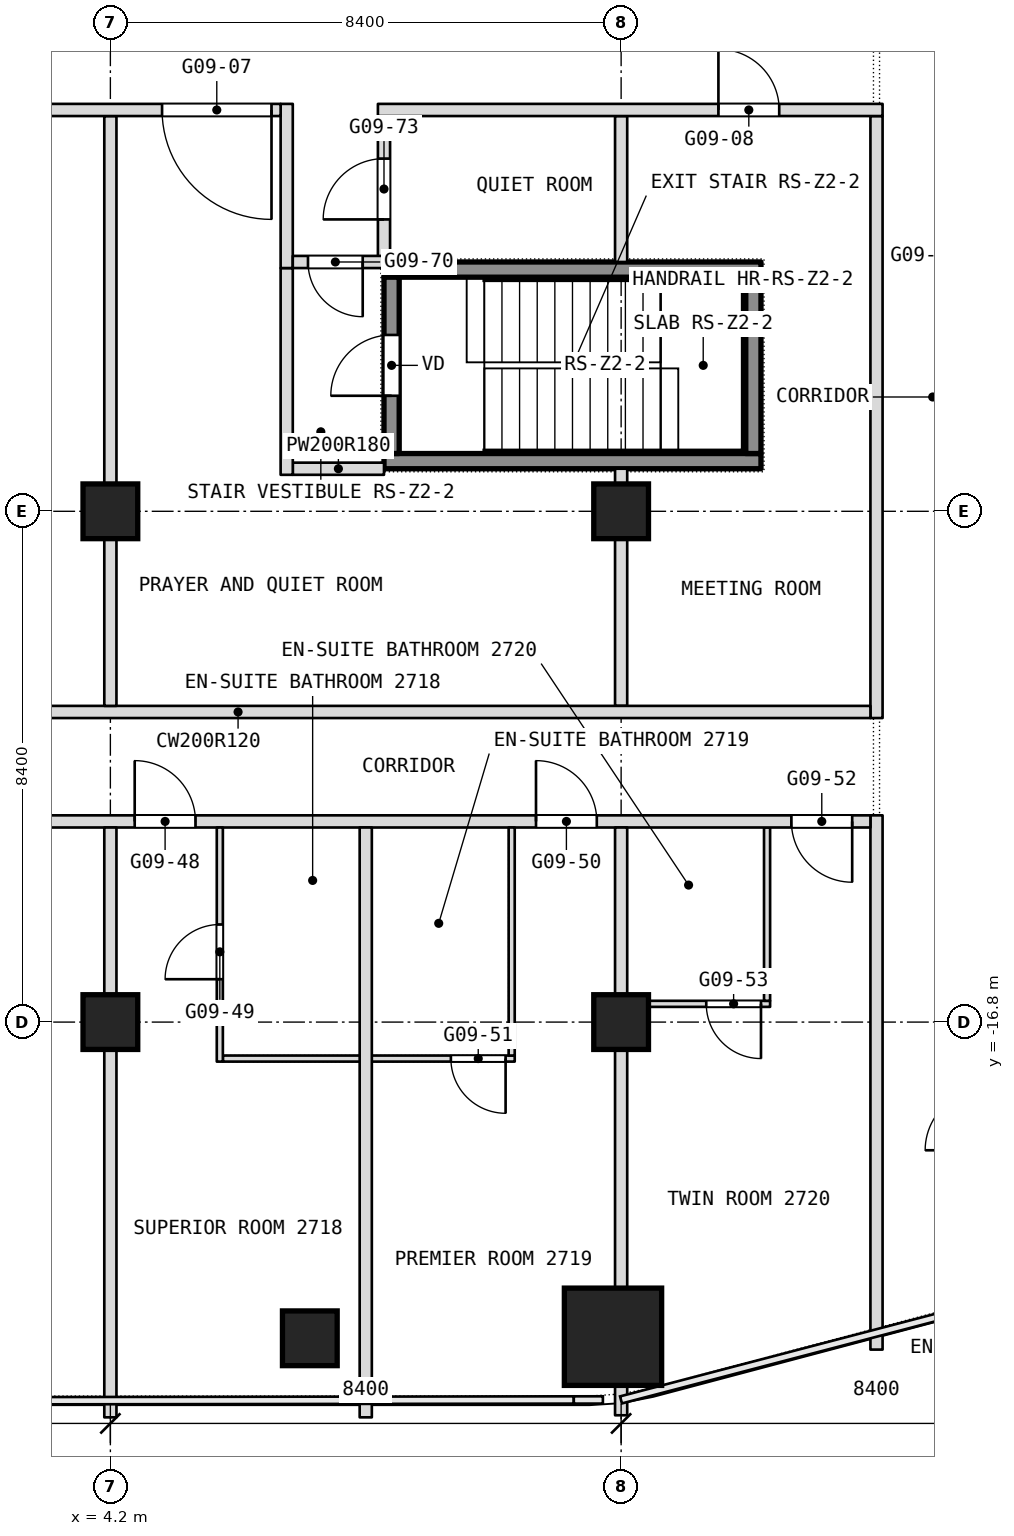
"""IFC4 building model, lengths in metres.
Left out: names, types, materials, properties, quantities, classifications, styles, units other than length and angle.
Written with IfcOpenShell. Run it as: python <this file> out.ifc"""

import sys

from ifc_helpers import new_model, si_unit, direction, frame, frame_2d, origin, origin_2d, place, context, subcontext, project, spatial, rectangle, extrude, element, fill, save


model = new_model("IFC4")
c1 = context("Model", 3, precision=1e-05, world=origin(), true_north=direction((0.0, 1.0)))
c2 = subcontext(c1, "Body", "Model", "MODEL_VIEW")
j1 = project(units=[si_unit("LENGTHUNIT", "METRE"), si_unit("PLANEANGLEUNIT", "RADIAN")], contexts=[c1])
p1 = place(None, origin())
s1 = spatial("IfcSite", under=j1, at=p1, CompositionType="ELEMENT")
p2 = place(p1, origin())
s2 = spatial("IfcBuilding", under=s1, at=p2, CompositionType="ELEMENT")
p3 = place(p2, frame((0.0, 0.0, 122.9)))
s3 = spatial("IfcBuildingStorey", under=s2, at=p3, CompositionType="ELEMENT", Elevation=122.9)
p4 = place(p3, frame((12.466, -21.975, 0.0), z_axis=(0.0, 0.0, 1.0), x_axis=(1.0, 0.0, 0.0)))
e1 = element("IfcColumn", 1, at=p4, inside=s3, PredefinedType="COLUMN", context=c2, shape_type="SweptSolid", body=[
    extrude(rectangle(XDim=1.6, YDim=1.6, at=origin_2d()), origin(), (0.0, 0.0, 1.0), 3.6),
])
for number, where, z_axis, x_axis in (
    (2, (4.2, -16.8, 0.0), (0.0, 0.0, 1.0), (1.0, 0.0, 0.0)),
    (3, (4.2, -8.4, 0.0), (0.0, 0.0, 1.0), (1.0, 0.0, 0.0)),
    (4, (12.6, -16.8, 0.0), (0.0, 0.0, 1.0), (1.0, 0.0, 0.0)),
    (5, (12.6, -8.4, 0.0), (0.0, 0.0, 1.0), (1.0, 0.0, 0.0)),
    (6, (7.48, -22.0, 0.0), (0.0, 0.0, 1.0), (1.0, 0.0, 0.0)),
):
    element("IfcColumn", number, at=place(p3, frame(where, z_axis=z_axis, x_axis=x_axis)), inside=s3, PredefinedType="COLUMN", context=c2, shape_type="SweptSolid", body=[
        extrude(rectangle(XDim=0.9, YDim=0.9, at=origin_2d()), origin(), (0.0, 0.0, 1.0), 3.6),
    ])
p5 = place(p3, frame((6.05, -17.4, 0.0), z_axis=(0.0, 0.0, 1.0), x_axis=(1.0, 0.0, 0.0)))
e7 = element("IfcWall", 7, at=p5, inside=s3, PredefinedType="PARTITIONING", context=c2, shape_type="SweptSolid", body=[
    extrude(rectangle(XDim=4.8, YDim=0.1, at=frame_2d((2.4, 0.0))), origin(), (0.0, 0.0, 1.0), 3.34),
])
p6 = place(p5, frame((3.75, 0.0, 0.0)))
e8 = element("IfcOpeningElement", 8, at=p6, cuts=e7, PredefinedType="OPENING", context=c2, shape_type="SweptSolid", body=[
    extrude(rectangle(XDim=0.9, YDim=2.1, at=frame_2d((0.45, 1.05))), frame((0.0, 0.05, 0.0), z_axis=(0.0, -1.0, 0.0), x_axis=(1.0, 0.0, 0.0)), (0.0, 0.0, 1.0), 0.1),
])
p7 = place(p3, frame((16.8, -22.186, 0.0), z_axis=(0.0, 0.0, 1.0), x_axis=(0.0, 1.0, 0.0)))
e9 = element("IfcWall", 9, at=p7, inside=s3, PredefinedType="PARTITIONING", context=c2, shape_type="SweptSolid", body=[
    extrude(rectangle(XDim=8.786, YDim=0.2, at=frame_2d((4.393, 0.0))), origin(), (0.0, 0.0, 1.0), 3.34),
])
p8 = place(p3, frame((16.8, -11.8, 0.0), z_axis=(0.0, 0.0, 1.0), x_axis=(0.0, 1.0, 0.0)))
e10 = element("IfcWall", 10, at=p8, inside=s3, PredefinedType="PARTITIONING", context=c2, shape_type="SweptSolid", body=[
    extrude(rectangle(XDim=9.9, YDim=0.2, at=frame_2d((4.95, 0.0))), origin(), (0.0, 0.0, 1.0), 3.34),
])
p9 = place(p3, frame((12.7, -16.5, 0.0), z_axis=(0.0, 0.0, 1.0), x_axis=(1.0, 0.0, 0.0)))
e11 = element("IfcWall", 11, at=p9, inside=s3, PredefinedType="PARTITIONING", context=c2, shape_type="SweptSolid", body=[
    extrude(rectangle(XDim=2.35, YDim=0.1, at=frame_2d((1.175, 0.0))), origin(), (0.0, 0.0, 1.0), 3.34),
])
p10 = place(p9, frame((1.3, 0.0, 0.0)))
e12 = element("IfcOpeningElement", 12, at=p10, cuts=e11, PredefinedType="OPENING", context=c2, shape_type="SweptSolid", body=[
    extrude(rectangle(XDim=0.9, YDim=2.1, at=frame_2d((0.45, 1.05))), frame((0.0, 0.05, 0.0), z_axis=(0.0, -1.0, 0.0), x_axis=(1.0, 0.0, 0.0)), (0.0, 0.0, 1.0), 0.1),
])
p11 = place(p3, frame((15.0, -16.45, 0.0), z_axis=(0.0, 0.0, 1.0), x_axis=(0.0, 1.0, 0.0)))
e13 = element("IfcWall", 13, at=p11, inside=s3, PredefinedType="PARTITIONING", context=c2, shape_type="SweptSolid", body=[
    extrude(rectangle(XDim=2.85, YDim=0.1, at=frame_2d((1.425, 0.0))), origin(), (0.0, 0.0, 1.0), 3.34),
])
p12 = place(p3, frame((-3.2, -13.5, 0.0), z_axis=(0.0, 0.0, 1.0), x_axis=(1.0, 0.0, 0.0)))
e14 = element("IfcWall", 14, at=p12, inside=s3, PredefinedType="PARTITIONING", context=c2, shape_type="SweptSolid", body=[
    extrude(rectangle(XDim=19.9, YDim=0.2, at=frame_2d((9.95, 0.0))), origin(), (0.0, 0.0, 1.0), 3.34),
])
p13 = place(p12, frame((2.3, 0.0, 0.0)))
e15 = element("IfcOpeningElement", 15, at=p13, cuts=e14, PredefinedType="OPENING", context=c2, shape_type="SweptSolid", body=[
    extrude(rectangle(XDim=1.8, YDim=2.1, at=frame_2d((0.9, 1.05))), frame((0.0, 0.1, 0.0), z_axis=(0.0, -1.0, 0.0), x_axis=(1.0, 0.0, 0.0)), (0.0, 0.0, 1.0), 0.2),
])
p14 = place(p12, frame((7.8, 0.0, 0.0)))
e16 = element("IfcOpeningElement", 16, at=p14, cuts=e14, PredefinedType="OPENING", context=c2, shape_type="SweptSolid", body=[
    extrude(rectangle(XDim=1.0, YDim=2.1, at=frame_2d((0.5, 1.05))), frame((0.0, 0.1, 0.0), z_axis=(0.0, -1.0, 0.0), x_axis=(1.0, 0.0, 0.0)), (0.0, 0.0, 1.0), 0.2),
])
p15 = place(p12, frame((14.4, 0.0, 0.0)))
e17 = element("IfcOpeningElement", 17, at=p15, cuts=e14, PredefinedType="OPENING", context=c2, shape_type="SweptSolid", body=[
    extrude(rectangle(XDim=1.0, YDim=2.1, at=frame_2d((0.5, 1.05))), frame((0.0, 0.1, 0.0), z_axis=(0.0, -1.0, 0.0), x_axis=(1.0, 0.0, 0.0)), (0.0, 0.0, 1.0), 0.2),
])
p16 = place(p12, frame((18.6, 0.0, 0.0)))
e18 = element("IfcOpeningElement", 18, at=p16, cuts=e14, PredefinedType="OPENING", context=c2, shape_type="SweptSolid", body=[
    extrude(rectangle(XDim=1.0, YDim=2.1, at=frame_2d((0.5, 1.05))), frame((0.0, 0.1, 0.0), z_axis=(0.0, -1.0, 0.0), x_axis=(1.0, 0.0, 0.0)), (0.0, 0.0, 1.0), 0.2),
])
p17 = place(p3, frame((12.6, -23.266, 0.0), z_axis=(0.0, 0.0, 1.0), x_axis=(0.0, 1.0, 0.0)))
e19 = element("IfcWall", 19, at=p17, inside=s3, PredefinedType="PARTITIONING", context=c2, shape_type="SweptSolid", body=[
    extrude(rectangle(XDim=0.491, YDim=0.2, at=frame_2d((0.246, 0.0))), origin(), (0.0, 0.0, 1.0), 3.34),
])
p18 = place(p3, frame((12.6, -21.175, 0.0), z_axis=(0.0, 0.0, 1.0), x_axis=(0.0, 1.0, 0.0)))
e20 = element("IfcWall", 20, at=p18, inside=s3, PredefinedType="PARTITIONING", context=c2, shape_type="SweptSolid", body=[
    extrude(rectangle(XDim=7.575, YDim=0.2, at=frame_2d((3.788, 0.0))), origin(), (0.0, 0.0, 1.0), 3.34),
])
p19 = place(p3, frame((12.6, -11.6, 0.0), z_axis=(0.0, 0.0, 1.0), x_axis=(0.0, 1.0, 0.0)))
e21 = element("IfcWall", 21, at=p19, inside=s3, PredefinedType="PARTITIONING", context=c2, shape_type="SweptSolid", body=[
    extrude(rectangle(XDim=3.9, YDim=0.2, at=frame_2d((1.95, 0.0))), origin(), (0.0, 0.0, 1.0), 3.34),
])
p20 = place(p3, frame((12.6, -4.3, 0.0), z_axis=(0.0, 0.0, 1.0), x_axis=(0.0, 1.0, 0.0)))
e22 = element("IfcWall", 22, at=p20, inside=s3, PredefinedType="PARTITIONING", context=c2, shape_type="SweptSolid", body=[
    extrude(rectangle(XDim=2.4, YDim=0.2, at=frame_2d((1.2, 0.0))), origin(), (0.0, 0.0, 1.0), 3.34),
])
p21 = place(p3, frame((-4.1, -11.7, 0.0), z_axis=(0.0, 0.0, 1.0), x_axis=(1.0, 0.0, 0.0)))
e23 = element("IfcWall", 23, at=p21, inside=s3, PredefinedType="PARTITIONING", context=c2, shape_type="SweptSolid", body=[
    extrude(rectangle(XDim=20.8, YDim=0.2, at=frame_2d((10.4, 0.0))), origin(), (0.0, 0.0, 1.0), 3.34),
])
p22 = place(p3, frame((10.8, -17.35, 0.0), z_axis=(0.0, 0.0, 1.0), x_axis=(0.0, 1.0, 0.0)))
e24 = element("IfcWall", 24, at=p22, inside=s3, PredefinedType="PARTITIONING", context=c2, shape_type="SweptSolid", body=[
    extrude(rectangle(XDim=3.75, YDim=0.1, at=frame_2d((1.875, 0.0))), origin(), (0.0, 0.0, 1.0), 3.34),
])
p23 = place(p3, frame((8.7, -4.3, 0.0), z_axis=(0.0, 0.0, 1.0), x_axis=(0.0, 1.0, 0.0)))
e25 = element("IfcWall", 25, at=p23, inside=s3, PredefinedType="PARTITIONING", context=c2, shape_type="SweptSolid", body=[
    extrude(rectangle(XDim=2.4, YDim=0.2, at=frame_2d((1.2, 0.0))), origin(), (0.0, 0.0, 1.0), 3.34),
])
p24 = place(p23, frame((0.7, 0.0, 0.0)))
e26 = element("IfcOpeningElement", 26, at=p24, cuts=e25, PredefinedType="OPENING", context=c2, shape_type="SweptSolid", body=[
    extrude(rectangle(XDim=1.0, YDim=2.1, at=frame_2d((0.5, 1.05))), frame((0.0, 0.1, 0.0), z_axis=(0.0, -1.0, 0.0), x_axis=(1.0, 0.0, 0.0)), (0.0, 0.0, 1.0), 0.2),
])
p25 = place(p3, frame((8.4, -23.3, 0.0), z_axis=(0.0, 0.0, 1.0), x_axis=(0.0, 1.0, 0.0)))
e27 = element("IfcWall", 27, at=p25, inside=s3, PredefinedType="PARTITIONING", context=c2, shape_type="SweptSolid", body=[
    extrude(rectangle(XDim=9.7, YDim=0.2, at=frame_2d((4.85, 0.0))), origin(), (0.0, 0.0, 1.0), 3.34),
])
p26 = place(p3, frame((7.2, -7.7, 0.0), z_axis=(0.0, 0.0, 1.0), x_axis=(1.0, 0.0, 0.0)))
e28 = element("IfcWall", 28, at=p26, inside=s3, PredefinedType="PARTITIONING", context=c2, shape_type="SweptSolid", body=[
    extrude(rectangle(XDim=1.5, YDim=0.2, at=frame_2d((0.75, 0.0))), origin(), (0.0, 0.0, 1.0), 3.34),
])
p27 = place(p3, frame((7.1, -7.8, 0.0), z_axis=(0.0, 0.0, 1.0), x_axis=(0.0, 1.0, 0.0)))
e29 = element("IfcWall", 29, at=p27, inside=s3, PredefinedType="PARTITIONING", context=c2, shape_type="SweptSolid", body=[
    extrude(rectangle(XDim=3.4, YDim=0.2, at=frame_2d((1.7, 0.0))), origin(), (0.0, 0.0, 1.0), 3.34),
])
p28 = place(p3, frame((7.1, -4.4, 0.0), z_axis=(0.0, 0.0, 1.0), x_axis=(0.0, 1.0, 0.0)))
e30 = element("IfcWall", 30, at=p28, inside=s3, PredefinedType="PARTITIONING", context=c2, shape_type="SweptSolid", body=[
    extrude(rectangle(XDim=2.7, YDim=0.2, at=frame_2d((1.35, 0.0))), origin(), (0.0, 0.0, 1.0), 3.34),
])
p29 = place(p3, frame((6.0, -17.45, 0.0), z_axis=(0.0, 0.0, 1.0), x_axis=(0.0, 1.0, 0.0)))
e31 = element("IfcWall", 31, at=p29, inside=s3, PredefinedType="PARTITIONING", context=c2, shape_type="SweptSolid", body=[
    extrude(rectangle(XDim=3.85, YDim=0.1, at=frame_2d((1.925, 0.0))), origin(), (0.0, 0.0, 1.0), 3.34),
])
p30 = place(p29, frame((1.355, 0.0, 0.0)))
e32 = element("IfcOpeningElement", 32, at=p30, cuts=e31, PredefinedType="OPENING", context=c2, shape_type="SweptSolid", body=[
    extrude(rectangle(XDim=0.9, YDim=2.1, at=frame_2d((0.45, 1.05))), frame((0.0, 0.05, 0.0), z_axis=(0.0, -1.0, 0.0), x_axis=(1.0, 0.0, 0.0)), (0.0, 0.0, 1.0), 0.1),
])
p31 = place(p3, frame((7.2, -4.3, 0.0), z_axis=(0.0, 0.0, 1.0), x_axis=(1.0, 0.0, 0.0)))
e33 = element("IfcWall", 33, at=p31, inside=s3, PredefinedType="PARTITIONING", context=c2, shape_type="SweptSolid", body=[
    extrude(rectangle(XDim=1.5, YDim=0.2, at=frame_2d((0.75, 0.0))), origin(), (0.0, 0.0, 1.0), 3.34),
])
p32 = place(p31, frame((0.25, 0.0, 0.0)))
e34 = element("IfcOpeningElement", 34, at=p32, cuts=e33, PredefinedType="OPENING", context=c2, shape_type="SweptSolid", body=[
    extrude(rectangle(XDim=0.9, YDim=2.1, at=frame_2d((0.45, 1.05))), frame((0.0, 0.1, 0.0), z_axis=(0.0, -1.0, 0.0), x_axis=(1.0, 0.0, 0.0)), (0.0, 0.0, 1.0), 0.2),
])
p33 = place(p3, frame((4.2, -23.3, 0.0), z_axis=(0.0, 0.0, 1.0), x_axis=(0.0, 1.0, 0.0)))
e35 = element("IfcWall", 35, at=p33, inside=s3, PredefinedType="PARTITIONING", context=c2, shape_type="SweptSolid", body=[
    extrude(rectangle(XDim=9.7, YDim=0.2, at=frame_2d((4.85, 0.0))), origin(), (0.0, 0.0, 1.0), 3.34),
])
p34 = place(p3, frame((4.2, -11.6, 0.0), z_axis=(0.0, 0.0, 1.0), x_axis=(0.0, 1.0, 0.0)))
e36 = element("IfcWall", 36, at=p34, inside=s3, PredefinedType="PARTITIONING", context=c2, shape_type="SweptSolid", body=[
    extrude(rectangle(XDim=9.7, YDim=0.2, at=frame_2d((4.85, 0.0))), origin(), (0.0, 0.0, 1.0), 3.34),
])
p35 = place(p3, frame((-4.3, -1.8, 0.0), z_axis=(0.0, 0.0, 1.0), x_axis=(1.0, 0.0, 0.0)))
e37 = element("IfcWall", 37, at=p35, inside=s3, PredefinedType="PARTITIONING", context=c2, shape_type="SweptSolid", body=[
    extrude(rectangle(XDim=11.3, YDim=0.2, at=frame_2d((5.65, 0.0))), origin(), (0.0, 0.0, 1.0), 3.34),
])
p36 = place(p35, frame((1.7, 0.0, 0.0)))
e38 = element("IfcOpeningElement", 38, at=p36, cuts=e37, PredefinedType="OPENING", context=c2, shape_type="SweptSolid", body=[
    extrude(rectangle(XDim=1.0, YDim=2.1, at=frame_2d((0.5, 1.05))), frame((0.0, 0.1, 0.0), z_axis=(0.0, -1.0, 0.0), x_axis=(1.0, 0.0, 0.0)), (0.0, 0.0, 1.0), 0.2),
])
p37 = place(p35, frame((5.9, 0.0, 0.0)))
e39 = element("IfcOpeningElement", 39, at=p37, cuts=e37, PredefinedType="OPENING", context=c2, shape_type="SweptSolid", body=[
    extrude(rectangle(XDim=1.0, YDim=2.1, at=frame_2d((0.5, 1.05))), frame((0.0, 0.1, 0.0), z_axis=(0.0, -1.0, 0.0), x_axis=(1.0, 0.0, 0.0)), (0.0, 0.0, 1.0), 0.2),
])
p38 = place(p35, frame((9.35, 0.0, 0.0)))
e40 = element("IfcOpeningElement", 40, at=p38, cuts=e37, PredefinedType="OPENING", context=c2, shape_type="SweptSolid", body=[
    extrude(rectangle(XDim=1.8, YDim=2.1, at=frame_2d((0.9, 1.05))), frame((0.0, 0.1, 0.0), z_axis=(0.0, -1.0, 0.0), x_axis=(1.0, 0.0, 0.0)), (0.0, 0.0, 1.0), 0.2),
])
p39 = place(p3, frame((8.6, -1.8, 0.0), z_axis=(0.0, 0.0, 1.0), x_axis=(1.0, 0.0, 0.0)))
e41 = element("IfcWall", 41, at=p39, inside=s3, PredefinedType="PARTITIONING", context=c2, shape_type="SweptSolid", body=[
    extrude(rectangle(XDim=8.3, YDim=0.2, at=frame_2d((4.15, 0.0))), origin(), (0.0, 0.0, 1.0), 3.34),
])
p40 = place(p39, frame((5.6, 0.0, 0.0)))
e42 = element("IfcOpeningElement", 42, at=p40, cuts=e41, PredefinedType="OPENING", context=c2, shape_type="SweptSolid", body=[
    extrude(rectangle(XDim=1.0, YDim=2.1, at=frame_2d((0.5, 1.05))), frame((0.0, 0.1, 0.0), z_axis=(0.0, -1.0, 0.0), x_axis=(1.0, 0.0, 0.0)), (0.0, 0.0, 1.0), 0.2),
])
for number, where, z_axis, x_axis in (
    (43, (8.7, -7.575, 0.1), (0.0, 0.0, 1.0), (1.0, 0.0, 0.0)),
    (44, (8.7, -4.425, 0.1), (0.0, 0.0, 1.0), (1.0, 0.0, 0.0)),
):
    element("IfcWall", number, at=place(p3, frame(where, z_axis=z_axis, x_axis=x_axis)), inside=s3, PredefinedType="SHEAR", context=c2, shape_type="SweptSolid", body=[
        extrude(rectangle(XDim=6.2, YDim=0.25, at=frame_2d((3.1, 0.0))), origin(), (0.0, 0.0, 1.0), 3.6),
    ])
p41 = place(p3, frame((8.825, -7.45, 0.1), z_axis=(0.0, 0.0, 1.0), x_axis=(0.0, 1.0, 0.0)))
e45 = element("IfcWall", 45, at=p41, inside=s3, PredefinedType="SHEAR", context=c2, shape_type="SweptSolid", body=[
    extrude(rectangle(XDim=2.9, YDim=0.25, at=frame_2d((1.45, 0.0))), origin(), (0.0, 0.0, 1.0), 3.6),
])
p42 = place(p41, frame((0.95, 0.0, 0.0)))
e46 = element("IfcOpeningElement", 46, at=p42, cuts=e45, PredefinedType="OPENING", context=c2, shape_type="SweptSolid", body=[
    extrude(rectangle(XDim=1.0, YDim=2.1, at=frame_2d((0.5, 1.05))), frame((0.0, 0.125, 0.0), z_axis=(0.0, -1.0, 0.0), x_axis=(1.0, 0.0, 0.0)), (0.0, 0.0, 1.0), 0.25),
])
p43 = place(p3, frame((14.775, -7.45, 0.1), z_axis=(0.0, 0.0, 1.0), x_axis=(0.0, 1.0, 0.0)))
e47 = element("IfcWall", 47, at=p43, inside=s3, PredefinedType="SHEAR", context=c2, shape_type="SweptSolid", body=[
    extrude(rectangle(XDim=2.9, YDim=0.25, at=frame_2d((1.45, 0.0))), origin(), (0.0, 0.0, 1.0), 3.6),
])
p44 = place(p6, origin())
e48 = element("IfcDoor", 48, at=p44, inside=s3, OperationType="SINGLE_SWING_RIGHT", PredefinedType="DOOR", context=c2, shape_type="SweptSolid", body=[
    extrude(rectangle(XDim=0.9, YDim=2.1, at=frame_2d((0.45, 1.05))), frame((0.0, 0.025, 0.0), z_axis=(0.0, -1.0, 0.0), x_axis=(1.0, 0.0, 0.0)), (0.0, 0.0, 1.0), 0.05),
])
fill(e8, e48)
p45 = place(p10, origin())
e49 = element("IfcDoor", 49, at=p45, inside=s3, OperationType="SINGLE_SWING_RIGHT", PredefinedType="DOOR", context=c2, shape_type="SweptSolid", body=[
    extrude(rectangle(XDim=0.9, YDim=2.1, at=frame_2d((0.45, 1.05))), frame((0.0, 0.025, 0.0), z_axis=(0.0, -1.0, 0.0), x_axis=(1.0, 0.0, 0.0)), (0.0, 0.0, 1.0), 0.05),
])
fill(e12, e49)
p46 = place(p14, origin())
e50 = element("IfcDoor", 50, at=p46, inside=s3, OperationType="SINGLE_SWING_RIGHT", PredefinedType="DOOR", context=c2, shape_type="SweptSolid", body=[
    extrude(rectangle(XDim=1.0, YDim=2.1, at=frame_2d((0.5, 1.05))), frame((0.0, 0.025, 0.0), z_axis=(0.0, -1.0, 0.0), x_axis=(1.0, 0.0, 0.0)), (0.0, 0.0, 1.0), 0.05),
])
fill(e16, e50)
p47 = place(p15, origin())
e51 = element("IfcDoor", 51, at=p47, inside=s3, OperationType="SINGLE_SWING_RIGHT", PredefinedType="DOOR", context=c2, shape_type="SweptSolid", body=[
    extrude(rectangle(XDim=1.0, YDim=2.1, at=frame_2d((0.5, 1.05))), frame((0.0, 0.025, 0.0), z_axis=(0.0, -1.0, 0.0), x_axis=(1.0, 0.0, 0.0)), (0.0, 0.0, 1.0), 0.05),
])
fill(e17, e51)
p48 = place(p16, origin())
e52 = element("IfcDoor", 52, at=p48, inside=s3, OperationType="SINGLE_SWING_LEFT", PredefinedType="DOOR", context=c2, shape_type="SweptSolid", body=[
    extrude(rectangle(XDim=1.0, YDim=2.1, at=frame_2d((0.5, 1.05))), frame((0.0, 0.025, 0.0), z_axis=(0.0, -1.0, 0.0), x_axis=(1.0, 0.0, 0.0)), (0.0, 0.0, 1.0), 0.05),
])
fill(e18, e52)
p49 = place(p24, origin())
e53 = element("IfcDoor", 53, at=p49, inside=s3, OperationType="SINGLE_SWING_LEFT", PredefinedType="DOOR", context=c2, shape_type="SweptSolid", body=[
    extrude(rectangle(XDim=1.0, YDim=2.1, at=frame_2d((0.5, 1.05))), frame((0.0, 0.025, 0.0), z_axis=(0.0, -1.0, 0.0), x_axis=(1.0, 0.0, 0.0)), (0.0, 0.0, 1.0), 0.05),
])
fill(e26, e53)
p50 = place(p30, origin())
e54 = element("IfcDoor", 54, at=p50, inside=s3, OperationType="SINGLE_SWING_RIGHT", PredefinedType="DOOR", context=c2, shape_type="SweptSolid", body=[
    extrude(rectangle(XDim=0.9, YDim=2.1, at=frame_2d((0.45, 1.05))), frame((0.0, 0.025, 0.0), z_axis=(0.0, -1.0, 0.0), x_axis=(1.0, 0.0, 0.0)), (0.0, 0.0, 1.0), 0.05),
])
fill(e32, e54)
p51 = place(p32, origin())
e55 = element("IfcDoor", 55, at=p51, inside=s3, OperationType="SINGLE_SWING_RIGHT", PredefinedType="DOOR", context=c2, shape_type="SweptSolid", body=[
    extrude(rectangle(XDim=0.9, YDim=2.1, at=frame_2d((0.45, 1.05))), frame((0.0, 0.025, 0.0), z_axis=(0.0, -1.0, 0.0), x_axis=(1.0, 0.0, 0.0)), (0.0, 0.0, 1.0), 0.05),
])
fill(e34, e55)
p52 = place(p38, origin())
e56 = element("IfcDoor", 56, at=p52, inside=s3, OperationType="DOUBLE_DOOR_SINGLE_SWING", PredefinedType="DOOR", context=c2, shape_type="SweptSolid", body=[
    extrude(rectangle(XDim=1.8, YDim=2.1, at=frame_2d((0.9, 1.05))), frame((0.0, 0.025, 0.0), z_axis=(0.0, -1.0, 0.0), x_axis=(1.0, 0.0, 0.0)), (0.0, 0.0, 1.0), 0.05),
])
fill(e40, e56)
p53 = place(p40, origin())
e57 = element("IfcDoor", 57, at=p53, inside=s3, OperationType="SINGLE_SWING_RIGHT", PredefinedType="DOOR", context=c2, shape_type="SweptSolid", body=[
    extrude(rectangle(XDim=1.0, YDim=2.1, at=frame_2d((0.5, 1.05))), frame((0.0, 0.025, 0.0), z_axis=(0.0, -1.0, 0.0), x_axis=(1.0, 0.0, 0.0)), (0.0, 0.0, 1.0), 0.05),
])
fill(e42, e57)
p54 = place(p42, origin())
e58 = element("IfcDoor", 58, at=p54, inside=s3, OperationType="SINGLE_SWING_LEFT", PredefinedType="DOOR", context=c2, shape_type="SweptSolid", body=[
    extrude(rectangle(XDim=1.0, YDim=2.1, at=frame_2d((0.5, 1.05))), frame((0.0, 0.025, 0.0), z_axis=(0.0, -1.0, 0.0), x_axis=(1.0, 0.0, 0.0)), (0.0, 0.0, 1.0), 0.05),
])
fill(e46, e58)
save(model, sys.argv[1])
